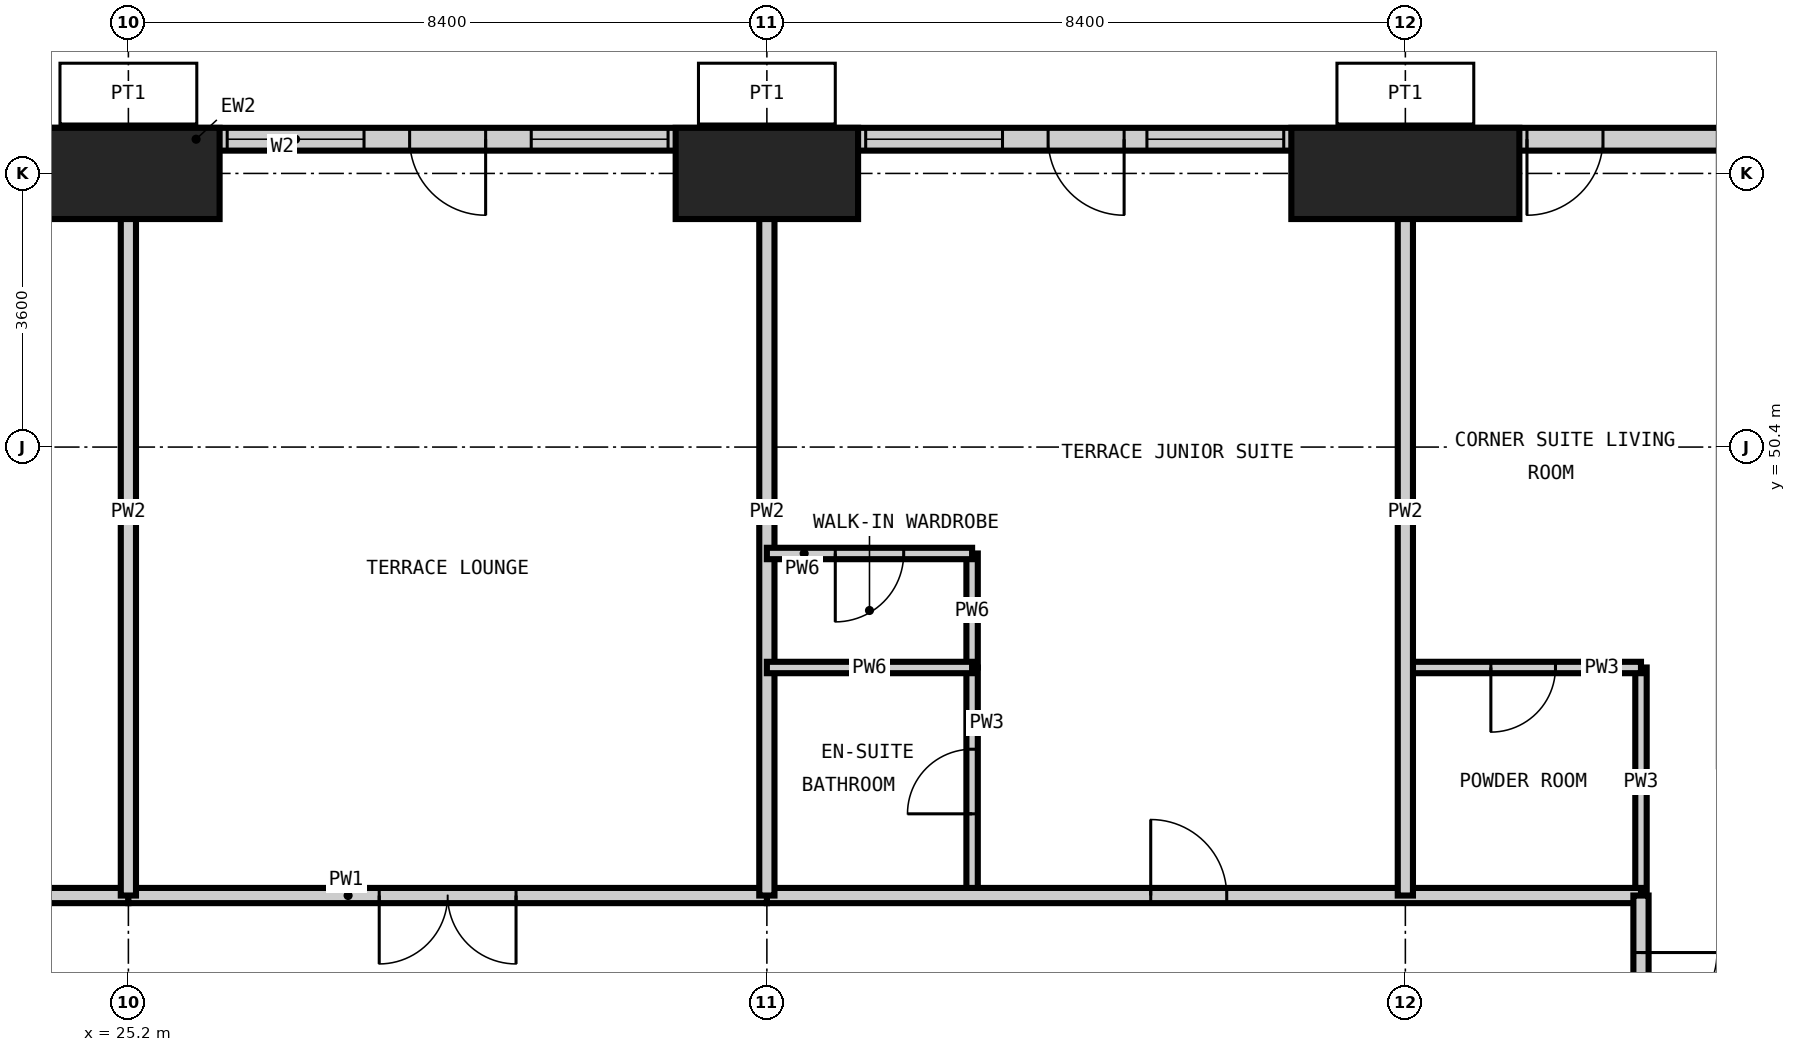
"""IFC4 building model, lengths in metres.
Left out: names, types, materials, properties, quantities, classifications, styles, units other than length and angle.
Written with IfcOpenShell. Run it as: python <this file> out.ifc"""

import sys

from ifc_helpers import new_model, si_unit, direction, frame, frame_2d, origin, origin_2d, place, context, subcontext, project, spatial, rectangle, extrude, element, fill, save


model = new_model("IFC4")
c1 = context("Model", 3, precision=1e-05, world=origin(), true_north=direction((0.0, 1.0)))
c2 = subcontext(c1, "Body", "Model", "MODEL_VIEW")
j1 = project(units=[si_unit("LENGTHUNIT", "METRE"), si_unit("PLANEANGLEUNIT", "RADIAN")], contexts=[c1])
p1 = place(None, origin())
s1 = spatial("IfcSite", under=j1, at=p1, CompositionType="ELEMENT")
p2 = place(p1, origin())
s2 = spatial("IfcBuilding", under=s1, at=p2, CompositionType="ELEMENT")
p3 = place(p2, frame((0.0, 0.0, 93.6)))
s3 = spatial("IfcBuildingStorey", under=s2, at=p3, CompositionType="ELEMENT", Elevation=93.6)
for number, where, z_axis, x_axis in (
    (1, (25.2, 54.0, -0.35), (0.0, 0.0, 1.0), (1.0, 0.0, 0.0)),
    (2, (33.6, 54.0, -0.35), (0.0, 0.0, 1.0), (1.0, 0.0, 0.0)),
):
    element("IfcColumn", number, at=place(p3, frame(where, z_axis=z_axis, x_axis=x_axis)), inside=s3, PredefinedType="COLUMN", context=c2, shape_type="SweptSolid", body=[
        extrude(rectangle(XDim=2.4, YDim=1.2, at=origin_2d()), origin(), (0.0, 0.0, 1.0), 3.6),
    ])
p4 = place(p3, frame((42.0, 54.0, -0.35), z_axis=(0.0, 0.0, 1.0), x_axis=(1.0, 0.0, 0.0)))
e3 = element("IfcColumn", 3, at=p4, inside=s3, PredefinedType="COLUMN", context=c2, shape_type="SweptSolid", body=[
    extrude(rectangle(XDim=3.0, YDim=1.2, at=origin_2d()), origin(), (0.0, 0.0, 1.0), 3.6),
])
p5 = place(p3, frame((51.9, 54.45, 0.0), z_axis=(0.0, 0.0, 1.0), x_axis=(-1.0, 0.0, 0.0)))
e4 = element("IfcWall", 4, at=p5, inside=s3, PredefinedType="SOLIDWALL", context=c2, shape_type="SweptSolid", body=[
    extrude(rectangle(XDim=49.2, YDim=0.3, at=frame_2d((24.6, 0.0))), origin(), (0.0, 0.0, 1.0), 3.25),
])
p6 = place(p5, frame((45.85, 0.0, 0.0)))
e5 = element("IfcOpeningElement", 5, at=p6, cuts=e4, PredefinedType="OPENING", context=c2, shape_type="SweptSolid", body=[
    extrude(rectangle(XDim=1.0, YDim=2.4, at=frame_2d((0.5, 1.2))), frame((0.0, 0.16, 0.0), z_axis=(0.0, -1.0, 0.0), x_axis=(1.0, 0.0, 0.0)), (0.0, 0.0, 1.0), 0.32),
])
p7 = place(p5, frame((47.1, 0.0, 0.6)))
e6 = element("IfcOpeningElement", 6, at=p7, cuts=e4, PredefinedType="OPENING", context=c2, shape_type="SweptSolid", body=[
    extrude(rectangle(XDim=1.8, YDim=2.1, at=frame_2d((0.9, 1.05))), frame((0.0, 0.16, 0.0), z_axis=(0.0, -1.0, 0.0), x_axis=(1.0, 0.0, 0.0)), (0.0, 0.0, 1.0), 0.32),
])
p8 = place(p5, frame((38.8, 0.0, 0.0)))
e7 = element("IfcOpeningElement", 7, at=p8, cuts=e4, PredefinedType="OPENING", context=c2, shape_type="SweptSolid", body=[
    extrude(rectangle(XDim=1.0, YDim=2.4, at=frame_2d((0.5, 1.2))), frame((0.0, 0.16, 0.0), z_axis=(0.0, -1.0, 0.0), x_axis=(1.0, 0.0, 0.0)), (0.0, 0.0, 1.0), 0.32),
])
p9 = place(p5, frame((40.4, 0.0, 0.6)))
e8 = element("IfcOpeningElement", 8, at=p9, cuts=e4, PredefinedType="OPENING", context=c2, shape_type="SweptSolid", body=[
    extrude(rectangle(XDim=1.8, YDim=2.1, at=frame_2d((0.9, 1.05))), frame((0.0, 0.16, 0.0), z_axis=(0.0, -1.0, 0.0), x_axis=(1.0, 0.0, 0.0)), (0.0, 0.0, 1.0), 0.32),
])
p10 = place(p5, frame((36.7, 0.0, 0.6)))
e9 = element("IfcOpeningElement", 9, at=p10, cuts=e4, PredefinedType="OPENING", context=c2, shape_type="SweptSolid", body=[
    extrude(rectangle(XDim=1.8, YDim=2.1, at=frame_2d((0.9, 1.05))), frame((0.0, 0.16, 0.0), z_axis=(0.0, -1.0, 0.0), x_axis=(1.0, 0.0, 0.0)), (0.0, 0.0, 1.0), 0.32),
])
p11 = place(p5, frame((30.4, 0.0, 0.0)))
e10 = element("IfcOpeningElement", 10, at=p11, cuts=e4, PredefinedType="OPENING", context=c2, shape_type="SweptSolid", body=[
    extrude(rectangle(XDim=1.0, YDim=2.4, at=frame_2d((0.5, 1.2))), frame((0.0, 0.16, 0.0), z_axis=(0.0, -1.0, 0.0), x_axis=(1.0, 0.0, 0.0)), (0.0, 0.0, 1.0), 0.32),
])
p12 = place(p5, frame((31.7, 0.0, 0.6)))
e11 = element("IfcOpeningElement", 11, at=p12, cuts=e4, PredefinedType="OPENING", context=c2, shape_type="SweptSolid", body=[
    extrude(rectangle(XDim=1.8, YDim=2.1, at=frame_2d((0.9, 1.05))), frame((0.0, 0.16, 0.0), z_axis=(0.0, -1.0, 0.0), x_axis=(1.0, 0.0, 0.0)), (0.0, 0.0, 1.0), 0.32),
])
p13 = place(p5, frame((28.0, 0.0, 0.6)))
e12 = element("IfcOpeningElement", 12, at=p13, cuts=e4, PredefinedType="OPENING", context=c2, shape_type="SweptSolid", body=[
    extrude(rectangle(XDim=1.8, YDim=2.1, at=frame_2d((0.9, 1.05))), frame((0.0, 0.16, 0.0), z_axis=(0.0, -1.0, 0.0), x_axis=(1.0, 0.0, 0.0)), (0.0, 0.0, 1.0), 0.32),
])
p14 = place(p5, frame((22.0, 0.0, 0.0)))
e13 = element("IfcOpeningElement", 13, at=p14, cuts=e4, PredefinedType="OPENING", context=c2, shape_type="SweptSolid", body=[
    extrude(rectangle(XDim=1.0, YDim=2.4, at=frame_2d((0.5, 1.2))), frame((0.0, 0.16, 0.0), z_axis=(0.0, -1.0, 0.0), x_axis=(1.0, 0.0, 0.0)), (0.0, 0.0, 1.0), 0.32),
])
p15 = place(p5, frame((23.6, 0.0, 0.6)))
e14 = element("IfcOpeningElement", 14, at=p15, cuts=e4, PredefinedType="OPENING", context=c2, shape_type="SweptSolid", body=[
    extrude(rectangle(XDim=1.8, YDim=2.1, at=frame_2d((0.9, 1.05))), frame((0.0, 0.16, 0.0), z_axis=(0.0, -1.0, 0.0), x_axis=(1.0, 0.0, 0.0)), (0.0, 0.0, 1.0), 0.32),
])
p16 = place(p5, frame((19.6, 0.0, 0.6)))
e15 = element("IfcOpeningElement", 15, at=p16, cuts=e4, PredefinedType="OPENING", context=c2, shape_type="SweptSolid", body=[
    extrude(rectangle(XDim=1.8, YDim=2.1, at=frame_2d((0.9, 1.05))), frame((0.0, 0.16, 0.0), z_axis=(0.0, -1.0, 0.0), x_axis=(1.0, 0.0, 0.0)), (0.0, 0.0, 1.0), 0.32),
])
p17 = place(p5, frame((13.6, 0.0, 0.0)))
e16 = element("IfcOpeningElement", 16, at=p17, cuts=e4, PredefinedType="OPENING", context=c2, shape_type="SweptSolid", body=[
    extrude(rectangle(XDim=1.0, YDim=2.4, at=frame_2d((0.5, 1.2))), frame((0.0, 0.16, 0.0), z_axis=(0.0, -1.0, 0.0), x_axis=(1.0, 0.0, 0.0)), (0.0, 0.0, 1.0), 0.32),
])
p18 = place(p5, frame((15.2, 0.0, 0.6)))
e17 = element("IfcOpeningElement", 17, at=p18, cuts=e4, PredefinedType="OPENING", context=c2, shape_type="SweptSolid", body=[
    extrude(rectangle(XDim=1.8, YDim=2.1, at=frame_2d((0.9, 1.05))), frame((0.0, 0.16, 0.0), z_axis=(0.0, -1.0, 0.0), x_axis=(1.0, 0.0, 0.0)), (0.0, 0.0, 1.0), 0.32),
])
p19 = place(p5, frame((11.5, 0.0, 0.6)))
e18 = element("IfcOpeningElement", 18, at=p19, cuts=e4, PredefinedType="OPENING", context=c2, shape_type="SweptSolid", body=[
    extrude(rectangle(XDim=1.8, YDim=2.1, at=frame_2d((0.9, 1.05))), frame((0.0, 0.16, 0.0), z_axis=(0.0, -1.0, 0.0), x_axis=(1.0, 0.0, 0.0)), (0.0, 0.0, 1.0), 0.32),
])
p20 = place(p5, frame((7.3, 0.0, 0.0)))
e19 = element("IfcOpeningElement", 19, at=p20, cuts=e4, PredefinedType="OPENING", context=c2, shape_type="SweptSolid", body=[
    extrude(rectangle(XDim=1.0, YDim=2.4, at=frame_2d((0.5, 1.2))), frame((0.0, 0.16, 0.0), z_axis=(0.0, -1.0, 0.0), x_axis=(1.0, 0.0, 0.0)), (0.0, 0.0, 1.0), 0.32),
])
p21 = place(p5, frame((2.75, 0.0, 0.0)))
e20 = element("IfcOpeningElement", 20, at=p21, cuts=e4, PredefinedType="OPENING", context=c2, shape_type="SweptSolid", body=[
    extrude(rectangle(XDim=1.0, YDim=2.4, at=frame_2d((0.5, 1.2))), frame((0.0, 0.16, 0.0), z_axis=(0.0, -1.0, 0.0), x_axis=(1.0, 0.0, 0.0)), (0.0, 0.0, 1.0), 0.32),
])
p22 = place(p3, frame((36.3, 44.5, 0.0), z_axis=(0.0, 0.0, 1.0), x_axis=(0.0, 1.0, 0.0)))
e21 = element("IfcWall", 21, at=p22, inside=s3, PredefinedType="PARTITIONING", context=c2, shape_type="SweptSolid", body=[
    extrude(rectangle(XDim=3.0, YDim=0.15, at=frame_2d((1.5, 0.0))), origin(), (0.0, 0.0, 1.0), 3.25),
])
p23 = place(p22, frame((1.075, 0.0, 0.0)))
e22 = element("IfcOpeningElement", 22, at=p23, cuts=e21, PredefinedType="OPENING", context=c2, shape_type="SweptSolid", body=[
    extrude(rectangle(XDim=0.85, YDim=2.1, at=frame_2d((0.425, 1.05))), frame((0.0, 0.085, 0.0), z_axis=(0.0, -1.0, 0.0), x_axis=(1.0, 0.0, 0.0)), (0.0, 0.0, 1.0), 0.17),
])
p24 = place(p3, frame((45.1, 44.5, 0.0), z_axis=(0.0, 0.0, 1.0), x_axis=(0.0, 1.0, 0.0)))
e23 = element("IfcWall", 23, at=p24, inside=s3, PredefinedType="PARTITIONING", context=c2, shape_type="SweptSolid", body=[
    extrude(rectangle(XDim=3.0, YDim=0.15, at=frame_2d((1.5, 0.0))), origin(), (0.0, 0.0, 1.0), 3.25),
])
p25 = place(p3, frame((42.0, 47.5, 0.0), z_axis=(0.0, 0.0, 1.0), x_axis=(1.0, 0.0, 0.0)))
e24 = element("IfcWall", 24, at=p25, inside=s3, PredefinedType="PARTITIONING", context=c2, shape_type="SweptSolid", body=[
    extrude(rectangle(XDim=3.1, YDim=0.15, at=frame_2d((1.55, 0.0))), origin(), (0.0, 0.0, 1.0), 3.25),
])
p26 = place(p25, frame((1.125, 0.0, 0.0)))
e25 = element("IfcOpeningElement", 25, at=p26, cuts=e24, PredefinedType="OPENING", context=c2, shape_type="SweptSolid", body=[
    extrude(rectangle(XDim=0.85, YDim=2.1, at=frame_2d((0.425, 1.05))), frame((0.0, 0.085, 0.0), z_axis=(0.0, -1.0, 0.0), x_axis=(1.0, 0.0, 0.0)), (0.0, 0.0, 1.0), 0.17),
])
p27 = place(p3, frame((12.6, 44.5, 0.0), z_axis=(0.0, 0.0, 1.0), x_axis=(1.0, 0.0, 0.0)))
e26 = element("IfcWall", 26, at=p27, inside=s3, PredefinedType="PARTITIONING", context=c2, shape_type="SweptSolid", body=[
    extrude(rectangle(XDim=12.6, YDim=0.2, at=frame_2d((6.3, 0.0))), origin(), (0.0, 0.0, 1.0), 3.25),
])
p28 = place(p27, frame((9.25, 0.0, 0.0)))
e27 = element("IfcOpeningElement", 27, at=p28, cuts=e26, PredefinedType="OPENING", context=c2, shape_type="SweptSolid", body=[
    extrude(rectangle(XDim=1.0, YDim=2.2, at=frame_2d((0.5, 1.1))), frame((0.0, 0.11, 0.0), z_axis=(0.0, -1.0, 0.0), x_axis=(1.0, 0.0, 0.0)), (0.0, 0.0, 1.0), 0.22),
])
p29 = place(p3, frame((33.6, 44.5, 0.0), z_axis=(0.0, 0.0, 1.0), x_axis=(1.0, 0.0, 0.0)))
e28 = element("IfcWall", 28, at=p29, inside=s3, PredefinedType="PARTITIONING", context=c2, shape_type="SweptSolid", body=[
    extrude(rectangle(XDim=11.5, YDim=0.2, at=frame_2d((5.75, 0.0))), origin(), (0.0, 0.0, 1.0), 3.25),
])
p30 = place(p29, frame((5.05, 0.0, 0.0)))
e29 = element("IfcOpeningElement", 29, at=p30, cuts=e28, PredefinedType="OPENING", context=c2, shape_type="SweptSolid", body=[
    extrude(rectangle(XDim=1.0, YDim=2.2, at=frame_2d((0.5, 1.1))), frame((0.0, 0.11, 0.0), z_axis=(0.0, -1.0, 0.0), x_axis=(1.0, 0.0, 0.0)), (0.0, 0.0, 1.0), 0.22),
])
p31 = place(p3, frame((45.1, 44.5, 0.0), z_axis=(0.0, 0.0, 1.0), x_axis=(0.0, -1.0, 0.0)))
e30 = element("IfcWall", 30, at=p31, inside=s3, PredefinedType="PARTITIONING", context=c2, shape_type="SweptSolid", body=[
    extrude(rectangle(XDim=31.4, YDim=0.2, at=frame_2d((15.7, 0.0))), origin(), (0.0, 0.0, 1.0), 3.25),
])
p32 = place(p31, frame((21.65, 0.0, 0.0)))
e31 = element("IfcOpeningElement", 31, at=p32, cuts=e30, PredefinedType="OPENING", context=c2, shape_type="SweptSolid", body=[
    extrude(rectangle(XDim=1.0, YDim=2.2, at=frame_2d((0.5, 1.1))), frame((0.0, 0.11, 0.0), z_axis=(0.0, -1.0, 0.0), x_axis=(1.0, 0.0, 0.0)), (0.0, 0.0, 1.0), 0.22),
])
p33 = place(p31, frame((15.95, 0.0, 0.0)))
e32 = element("IfcOpeningElement", 32, at=p33, cuts=e30, PredefinedType="OPENING", context=c2, shape_type="SweptSolid", body=[
    extrude(rectangle(XDim=1.0, YDim=2.2, at=frame_2d((0.5, 1.1))), frame((0.0, 0.11, 0.0), z_axis=(0.0, -1.0, 0.0), x_axis=(1.0, 0.0, 0.0)), (0.0, 0.0, 1.0), 0.22),
])
p34 = place(p31, frame((4.85, 0.0, 0.0)))
e33 = element("IfcOpeningElement", 33, at=p34, cuts=e30, PredefinedType="OPENING", context=c2, shape_type="SweptSolid", body=[
    extrude(rectangle(XDim=1.0, YDim=2.2, at=frame_2d((0.5, 1.1))), frame((0.0, 0.11, 0.0), z_axis=(0.0, -1.0, 0.0), x_axis=(1.0, 0.0, 0.0)), (0.0, 0.0, 1.0), 0.22),
])
p35 = place(p31, frame((29.05, 0.0, 0.0)))
e34 = element("IfcOpeningElement", 34, at=p35, cuts=e30, PredefinedType="OPENING", context=c2, shape_type="SweptSolid", body=[
    extrude(rectangle(XDim=1.0, YDim=2.2, at=frame_2d((0.5, 1.1))), frame((0.0, 0.11, 0.0), z_axis=(0.0, -1.0, 0.0), x_axis=(1.0, 0.0, 0.0)), (0.0, 0.0, 1.0), 0.22),
])
p36 = place(p31, frame((0.75, 0.0, 0.0)))
e35 = element("IfcOpeningElement", 35, at=p36, cuts=e30, PredefinedType="OPENING", context=c2, shape_type="SweptSolid", body=[
    extrude(rectangle(XDim=1.0, YDim=2.2, at=frame_2d((0.5, 1.1))), frame((0.0, 0.11, 0.0), z_axis=(0.0, -1.0, 0.0), x_axis=(1.0, 0.0, 0.0)), (0.0, 0.0, 1.0), 0.22),
])
p37 = place(p3, frame((33.6, 44.5, 0.0), z_axis=(0.0, 0.0, 1.0), x_axis=(-1.0, 0.0, 0.0)))
e36 = element("IfcWall", 36, at=p37, inside=s3, PredefinedType="PARTITIONING", context=c2, shape_type="SweptSolid", body=[
    extrude(rectangle(XDim=8.4, YDim=0.2, at=frame_2d((4.2, 0.0))), origin(), (0.0, 0.0, 1.0), 3.25),
])
p38 = place(p37, frame((3.3, 0.0, 0.0)))
e37 = element("IfcOpeningElement", 37, at=p38, cuts=e36, PredefinedType="OPENING", context=c2, shape_type="SweptSolid", body=[
    extrude(rectangle(XDim=1.8, YDim=2.4, at=frame_2d((0.9, 1.2))), frame((0.0, 0.11, 0.0), z_axis=(0.0, -1.0, 0.0), x_axis=(1.0, 0.0, 0.0)), (0.0, 0.0, 1.0), 0.22),
])
for number, where, z_axis, x_axis in (
    (38, (25.2, 44.5, 0.0), (0.0, 0.0, 1.0), (0.0, 1.0, 0.0)),
    (39, (33.6, 44.5, 0.0), (0.0, 0.0, 1.0), (0.0, 1.0, 0.0)),
    (40, (42.0, 44.5, 0.0), (0.0, 0.0, 1.0), (0.0, 1.0, 0.0)),
):
    element("IfcWall", number, at=place(p3, frame(where, z_axis=z_axis, x_axis=x_axis)), inside=s3, PredefinedType="PARTITIONING", context=c2, shape_type="SweptSolid", body=[
        extrude(rectangle(XDim=10.1, YDim=0.2, at=frame_2d((5.05, 0.0))), origin(), (0.0, 0.0, 1.0), 3.25),
    ])
p39 = place(p3, frame((36.3, 47.5, 0.0), z_axis=(0.0, 0.0, 1.0), x_axis=(0.0, 1.0, 0.0)))
e41 = element("IfcWall", 41, at=p39, inside=s3, PredefinedType="PARTITIONING", context=c2, shape_type="SweptSolid", body=[
    extrude(rectangle(XDim=1.5, YDim=0.15, at=frame_2d((0.75, 0.0))), origin(), (0.0, 0.0, 1.0), 3.25),
])
p40 = place(p3, frame((33.6, 47.5, 0.0), z_axis=(0.0, 0.0, 1.0), x_axis=(1.0, 0.0, 0.0)))
e42 = element("IfcWall", 42, at=p40, inside=s3, PredefinedType="PARTITIONING", context=c2, shape_type="SweptSolid", body=[
    extrude(rectangle(XDim=2.7, YDim=0.15, at=frame_2d((1.35, 0.0))), origin(), (0.0, 0.0, 1.0), 3.25),
])
p41 = place(p3, frame((33.6, 49.0, 0.0), z_axis=(0.0, 0.0, 1.0), x_axis=(1.0, 0.0, 0.0)))
e43 = element("IfcWall", 43, at=p41, inside=s3, PredefinedType="PARTITIONING", context=c2, shape_type="SweptSolid", body=[
    extrude(rectangle(XDim=2.7, YDim=0.15, at=frame_2d((1.35, 0.0))), origin(), (0.0, 0.0, 1.0), 3.25),
])
p42 = place(p41, frame((0.9, 0.0, 0.0)))
e44 = element("IfcOpeningElement", 44, at=p42, cuts=e43, PredefinedType="OPENING", context=c2, shape_type="SweptSolid", body=[
    extrude(rectangle(XDim=0.9, YDim=2.1, at=frame_2d((0.45, 1.05))), frame((0.0, 0.085, 0.0), z_axis=(0.0, -1.0, 0.0), x_axis=(1.0, 0.0, 0.0)), (0.0, 0.0, 1.0), 0.17),
])
p43 = place(p14, origin())
e45 = element("IfcDoor", 45, at=p43, inside=s3, OperationType="SINGLE_SWING_LEFT", PredefinedType="DOOR", context=c2, shape_type="SweptSolid", body=[
    extrude(rectangle(XDim=1.0, YDim=2.4, at=frame_2d((0.5, 1.2))), frame((0.0, 0.025, 0.0), z_axis=(0.0, -1.0, 0.0), x_axis=(1.0, 0.0, 0.0)), (0.0, 0.0, 1.0), 0.05),
])
fill(e13, e45)
p44 = place(p15, origin())
e46 = element("IfcWindow", 46, at=p44, inside=s3, PartitioningType="SINGLE_PANEL", PredefinedType="WINDOW", context=c2, shape_type="SweptSolid", body=[
    extrude(rectangle(XDim=1.8, YDim=2.1, at=frame_2d((0.9, 1.05))), frame((0.0, 0.03, 0.0), z_axis=(0.0, -1.0, 0.0), x_axis=(1.0, 0.0, 0.0)), (0.0, 0.0, 1.0), 0.06),
])
fill(e14, e46)
p45 = place(p16, origin())
e47 = element("IfcWindow", 47, at=p45, inside=s3, PartitioningType="SINGLE_PANEL", PredefinedType="WINDOW", context=c2, shape_type="SweptSolid", body=[
    extrude(rectangle(XDim=1.8, YDim=2.1, at=frame_2d((0.9, 1.05))), frame((0.0, 0.03, 0.0), z_axis=(0.0, -1.0, 0.0), x_axis=(1.0, 0.0, 0.0)), (0.0, 0.0, 1.0), 0.06),
])
fill(e15, e47)
p46 = place(p17, origin())
e48 = element("IfcDoor", 48, at=p46, inside=s3, OperationType="SINGLE_SWING_LEFT", PredefinedType="DOOR", context=c2, shape_type="SweptSolid", body=[
    extrude(rectangle(XDim=1.0, YDim=2.4, at=frame_2d((0.5, 1.2))), frame((0.0, 0.025, 0.0), z_axis=(0.0, -1.0, 0.0), x_axis=(1.0, 0.0, 0.0)), (0.0, 0.0, 1.0), 0.05),
])
fill(e16, e48)
p47 = place(p18, origin())
e49 = element("IfcWindow", 49, at=p47, inside=s3, PartitioningType="SINGLE_PANEL", PredefinedType="WINDOW", context=c2, shape_type="SweptSolid", body=[
    extrude(rectangle(XDim=1.8, YDim=2.1, at=frame_2d((0.9, 1.05))), frame((0.0, 0.03, 0.0), z_axis=(0.0, -1.0, 0.0), x_axis=(1.0, 0.0, 0.0)), (0.0, 0.0, 1.0), 0.06),
])
fill(e17, e49)
p48 = place(p19, origin())
e50 = element("IfcWindow", 50, at=p48, inside=s3, PartitioningType="SINGLE_PANEL", PredefinedType="WINDOW", context=c2, shape_type="SweptSolid", body=[
    extrude(rectangle(XDim=1.8, YDim=2.1, at=frame_2d((0.9, 1.05))), frame((0.0, 0.03, 0.0), z_axis=(0.0, -1.0, 0.0), x_axis=(1.0, 0.0, 0.0)), (0.0, 0.0, 1.0), 0.06),
])
fill(e18, e50)
p49 = place(p20, origin())
e51 = element("IfcDoor", 51, at=p49, inside=s3, OperationType="SINGLE_SWING_RIGHT", PredefinedType="DOOR", context=c2, shape_type="SweptSolid", body=[
    extrude(rectangle(XDim=1.0, YDim=2.4, at=frame_2d((0.5, 1.2))), frame((0.0, 0.025, 0.0), z_axis=(0.0, -1.0, 0.0), x_axis=(1.0, 0.0, 0.0)), (0.0, 0.0, 1.0), 0.05),
])
fill(e19, e51)
p50 = place(p38, origin())
e52 = element("IfcDoor", 52, at=p50, inside=s3, OperationType="DOUBLE_DOOR_DOUBLE_SWING", PredefinedType="DOOR", context=c2, shape_type="SweptSolid", body=[
    extrude(rectangle(XDim=1.8, YDim=2.4, at=frame_2d((0.9, 1.2))), frame((0.0, 0.025, 0.0), z_axis=(0.0, -1.0, 0.0), x_axis=(1.0, 0.0, 0.0)), (0.0, 0.0, 1.0), 0.05),
])
fill(e37, e52)
p51 = place(p30, origin())
e53 = element("IfcDoor", 53, at=p51, inside=s3, OperationType="SINGLE_SWING_LEFT", PredefinedType="DOOR", context=c2, shape_type="SweptSolid", body=[
    extrude(rectangle(XDim=1.0, YDim=2.2, at=frame_2d((0.5, 1.1))), frame((0.0, 0.025, 0.0), z_axis=(0.0, -1.0, 0.0), x_axis=(1.0, 0.0, 0.0)), (0.0, 0.0, 1.0), 0.05),
])
fill(e29, e53)
p52 = place(p23, origin())
e54 = element("IfcDoor", 54, at=p52, inside=s3, OperationType="SINGLE_SWING_LEFT", PredefinedType="DOOR", context=c2, shape_type="SweptSolid", body=[
    extrude(rectangle(XDim=0.85, YDim=2.1, at=frame_2d((0.425, 1.05))), frame((0.0, 0.025, 0.0), z_axis=(0.0, -1.0, 0.0), x_axis=(1.0, 0.0, 0.0)), (0.0, 0.0, 1.0), 0.05),
])
fill(e22, e54)
p53 = place(p42, frame((0.9, 0.0, 0.0), z_axis=(0.0, 0.0, 1.0), x_axis=(-1.0, 0.0, 0.0)))
e55 = element("IfcDoor", 55, at=p53, inside=s3, OperationType="SINGLE_SWING_RIGHT", PredefinedType="DOOR", context=c2, shape_type="SweptSolid", body=[
    extrude(rectangle(XDim=0.9, YDim=2.1, at=frame_2d((0.45, 1.05))), frame((0.0, 0.025, 0.0), z_axis=(0.0, -1.0, 0.0), x_axis=(1.0, 0.0, 0.0)), (0.0, 0.0, 1.0), 0.05),
])
fill(e44, e55)
p54 = place(p36, origin())
e56 = element("IfcDoor", 56, at=p54, inside=s3, OperationType="SINGLE_SWING_LEFT", PredefinedType="DOOR", context=c2, shape_type="SweptSolid", body=[
    extrude(rectangle(XDim=1.0, YDim=2.2, at=frame_2d((0.5, 1.1))), frame((0.0, 0.025, 0.0), z_axis=(0.0, -1.0, 0.0), x_axis=(1.0, 0.0, 0.0)), (0.0, 0.0, 1.0), 0.05),
])
fill(e35, e56)
p55 = place(p26, frame((0.85, 0.0, 0.0), z_axis=(0.0, 0.0, 1.0), x_axis=(-1.0, 0.0, 0.0)))
e57 = element("IfcDoor", 57, at=p55, inside=s3, OperationType="SINGLE_SWING_RIGHT", PredefinedType="DOOR", context=c2, shape_type="SweptSolid", body=[
    extrude(rectangle(XDim=0.85, YDim=2.1, at=frame_2d((0.425, 1.05))), frame((0.0, 0.025, 0.0), z_axis=(0.0, -1.0, 0.0), x_axis=(1.0, 0.0, 0.0)), (0.0, 0.0, 1.0), 0.05),
])
fill(e25, e57)
save(model, sys.argv[1])
